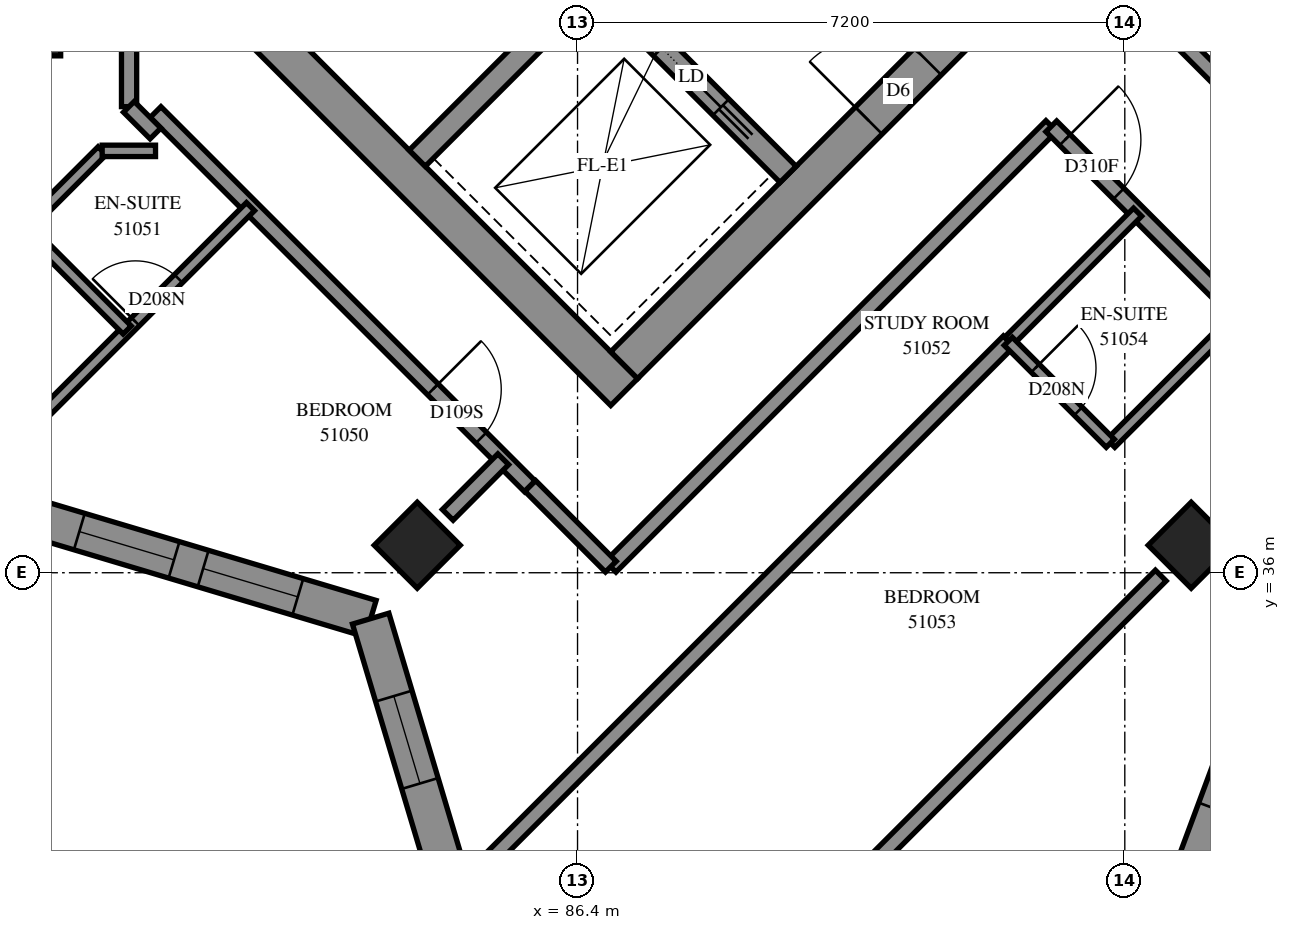
"""IFC4 building model, lengths in metres.
Left out: names, types, materials, properties, quantities, classifications, styles, units other than length and angle.
Written with IfcOpenShell. Run it as: python <this file> out.ifc"""

import sys

from ifc_helpers import new_model, si_unit, direction, frame, frame_2d, origin, origin_2d, place, context, subcontext, project, spatial, polyline, rectangle, outline, extrude, element, fill, save


model = new_model("IFC4")
c1 = context("Model", 3, precision=1e-05, world=origin(), true_north=direction((0.0, 1.0)))
c2 = subcontext(c1, "Body", "Model", "MODEL_VIEW")
j1 = project(units=[si_unit("LENGTHUNIT", "METRE"), si_unit("PLANEANGLEUNIT", "RADIAN")], contexts=[c1])
p1 = place(None, origin())
s1 = spatial("IfcSite", under=j1, at=p1, CompositionType="ELEMENT")
p2 = place(p1, origin())
s2 = spatial("IfcBuilding", under=s1, at=p2, CompositionType="ELEMENT")
p3 = place(p2, frame((0.0, 0.0, 189.6)))
s3 = spatial("IfcBuildingStorey", under=s2, at=p3, CompositionType="ELEMENT", Elevation=189.6)
for number, where, z_axis, x_axis in (
    (1, (79.2, 43.2, 0.0), (0.0, 0.0, 1.0), (1.0, 0.0, 0.0)),
    (2, (84.291, 36.362, 0.0), (0.0, 0.0, 1.0), (0.707, -0.707, 0.0)),
    (3, (94.474, 36.362, 0.0), (0.0, 0.0, 1.0), (0.707, -0.707, 0.0)),
):
    element("IfcColumn", number, at=place(p3, frame(where, z_axis=z_axis, x_axis=x_axis)), inside=s3, PredefinedType="COLUMN", context=c2, shape_type="SweptSolid", body=[
        extrude(rectangle(XDim=0.8, YDim=0.8, at=origin_2d()), origin(), (0.0, 0.0, 1.0), 3.1),
    ])
p4 = place(p3, frame((76.124, 49.267, -0.3), z_axis=(0.0, 0.0, 1.0), x_axis=(0.7071067812, -0.7071067812, 0.0)))
e4 = element("IfcWall", 4, at=p4, inside=s3, PredefinedType="SHEAR", context=c2, shape_type="SweptSolid", body=[
    extrude(rectangle(XDim=15.4, YDim=0.5, at=frame_2d((7.7, 0.0))), origin(), (0.0, 0.0, 1.0), 2.7),
])
p5 = place(p3, frame((87.013, 38.731, -0.3), z_axis=(0.0, 0.0, 1.0), x_axis=(0.7071067812, 0.7071067812, 0.0)))
e5 = element("IfcWall", 5, at=p5, inside=s3, PredefinedType="SHEAR", context=c2, shape_type="SweptSolid", body=[
    extrude(rectangle(XDim=14.4, YDim=0.5, at=frame_2d((7.2, 0.0))), origin(), (0.0, 0.0, 1.0), 2.7),
])
p6 = place(p5, frame((4.55, 0.0, 0.3)))
e6 = element("IfcOpeningElement", 6, at=p6, cuts=e5, PredefinedType="OPENING", context=c2, shape_type="SweptSolid", body=[
    extrude(rectangle(XDim=1.1, YDim=2.1, at=frame_2d((0.55, 1.05))), frame((0.0, 0.26, 0.0), z_axis=(0.0, -1.0, 0.0), x_axis=(1.0, 0.0, 0.0)), (0.0, 0.0, 1.0), 0.52),
])
p7 = place(p5, frame((11.35, 0.0, 0.3)))
e7 = element("IfcOpeningElement", 7, at=p7, cuts=e5, PredefinedType="OPENING", context=c2, shape_type="SweptSolid", body=[
    extrude(rectangle(XDim=1.1, YDim=2.1, at=frame_2d((0.55, 1.05))), frame((0.0, 0.26, 0.0), z_axis=(0.0, -1.0, 0.0), x_axis=(1.0, 0.0, 0.0)), (0.0, 0.0, 1.0), 0.52),
])
p8 = place(p3, frame((84.291, 41.453, 0.0), z_axis=(0.0, 0.0, 1.0), x_axis=(0.7071067812, 0.7071067812, 0.0)))
e8 = element("IfcWall", 8, at=p8, inside=s3, PredefinedType="SOLIDWALL", context=c2, shape_type="SweptSolid", body=[
    extrude(rectangle(XDim=3.3, YDim=0.3, at=frame_2d((1.65, 0.0))), origin(), (0.0, 0.0, 1.0), 3.1),
])
p9 = place(p3, frame((78.988, 51.423, 0.0), z_axis=(0.0, 0.0, 1.0), x_axis=(0.7071067812, -0.7071067812, 0.0)))
e9 = element("IfcWall", 9, at=p9, inside=s3, PredefinedType="SOLIDWALL", context=c2, shape_type="SweptSolid", body=[
    extrude(rectangle(XDim=14.4, YDim=0.3, at=frame_2d((7.2, 0.0))), origin(), (0.0, 0.0, 1.0), 3.1),
])
p10 = place(p9, frame((1.35, 0.0, 0.0)))
e10 = element("IfcOpeningElement", 10, at=p10, cuts=e9, PredefinedType="OPENING", context=c2, shape_type="SweptSolid", body=[
    extrude(rectangle(XDim=0.9, YDim=2.1, at=frame_2d((0.45, 1.05))), frame((0.0, 0.16, 0.0), z_axis=(0.0, -1.0, 0.0), x_axis=(1.0, 0.0, 0.0)), (0.0, 0.0, 1.0), 0.32),
])
p11 = place(p9, frame((4.95, 0.0, 0.0)))
e11 = element("IfcOpeningElement", 11, at=p11, cuts=e9, PredefinedType="OPENING", context=c2, shape_type="SweptSolid", body=[
    extrude(rectangle(XDim=0.9, YDim=2.1, at=frame_2d((0.45, 1.05))), frame((0.0, 0.16, 0.0), z_axis=(0.0, -1.0, 0.0), x_axis=(1.0, 0.0, 0.0)), (0.0, 0.0, 1.0), 0.32),
])
p12 = place(p9, frame((8.55, 0.0, 0.0)))
e12 = element("IfcOpeningElement", 12, at=p12, cuts=e9, PredefinedType="OPENING", context=c2, shape_type="SweptSolid", body=[
    extrude(rectangle(XDim=0.9, YDim=2.1, at=frame_2d((0.45, 1.05))), frame((0.0, 0.16, 0.0), z_axis=(0.0, -1.0, 0.0), x_axis=(1.0, 0.0, 0.0)), (0.0, 0.0, 1.0), 0.32),
])
p13 = place(p9, frame((12.05, 0.0, 0.0)))
e13 = element("IfcOpeningElement", 13, at=p13, cuts=e9, PredefinedType="OPENING", context=c2, shape_type="SweptSolid", body=[
    extrude(rectangle(XDim=1.1, YDim=2.1, at=frame_2d((0.55, 1.05))), frame((0.0, 0.16, 0.0), z_axis=(0.0, -1.0, 0.0), x_axis=(1.0, 0.0, 0.0)), (0.0, 0.0, 1.0), 0.32),
])
p14 = place(p3, frame((94.281, 31.47, 0.0), z_axis=(0.0, 0.0, 1.0), x_axis=(0.3481903374, 0.9374238577, 0.0)))
e14 = element("IfcWall", 14, at=p14, inside=s3, PredefinedType="SOLIDWALL", context=c2, shape_type="SweptSolid", body=[
    extrude(outline(polyline([(-0.12, -0.25), (5.16, -0.25), (5.39, 0.25), (0.12, 0.25), (-0.12, -0.25)])), origin(), (0.0, 0.0, 1.0), 3.1),
])
p15 = place(p14, frame((1.512, 0.0, 0.45)))
e15 = element("IfcOpeningElement", 15, at=p15, cuts=e14, PredefinedType="OPENING", context=c2, shape_type="SweptSolid", body=[
    extrude(rectangle(XDim=1.3, YDim=2.5, at=frame_2d((0.65, 1.25))), frame((0.0, 0.26, 0.0), z_axis=(0.0, -1.0, 0.0), x_axis=(1.0, 0.0, 0.0)), (0.0, 0.0, 1.0), 0.52),
])
p16 = place(p14, frame((3.012, 0.0, 0.45)))
e16 = element("IfcOpeningElement", 16, at=p16, cuts=e14, PredefinedType="OPENING", context=c2, shape_type="SweptSolid", body=[
    extrude(rectangle(XDim=1.3, YDim=2.5, at=frame_2d((0.65, 1.25))), frame((0.0, 0.26, 0.0), z_axis=(0.0, -1.0, 0.0), x_axis=(1.0, 0.0, 0.0)), (0.0, 0.0, 1.0), 0.52),
])
p17 = place(p3, frame((79.247, 36.721, 0.0), z_axis=(0.0, 0.0, 1.0), x_axis=(0.9581363614, -0.2863122647, 0.0)))
e17 = element("IfcWall", 17, at=p17, inside=s3, PredefinedType="SOLIDWALL", context=c2, shape_type="SweptSolid", body=[
    extrude(outline(polyline([(-0.141, -0.25), (4.49, -0.25), (4.76, 0.25), (0.141, 0.25), (-0.141, -0.25)])), origin(), (0.0, 0.0, 1.0), 3.1),
])
p18 = place(p17, frame((0.625, 0.0, 0.45)))
e18 = element("IfcOpeningElement", 18, at=p18, cuts=e17, PredefinedType="OPENING", context=c2, shape_type="SweptSolid", body=[
    extrude(rectangle(XDim=1.3, YDim=2.5, at=frame_2d((0.65, 1.25))), frame((0.0, 0.26, 0.0), z_axis=(0.0, -1.0, 0.0), x_axis=(1.0, 0.0, 0.0)), (0.0, 0.0, 1.0), 0.52),
])
p19 = place(p17, frame((2.325, 0.0, 0.45)))
e19 = element("IfcOpeningElement", 19, at=p19, cuts=e17, PredefinedType="OPENING", context=c2, shape_type="SweptSolid", body=[
    extrude(rectangle(XDim=1.3, YDim=2.5, at=frame_2d((0.65, 1.25))), frame((0.0, 0.26, 0.0), z_axis=(0.0, -1.0, 0.0), x_axis=(1.0, 0.0, 0.0)), (0.0, 0.0, 1.0), 0.52),
])
p20 = place(p3, frame((83.679, 35.396, 0.0), z_axis=(0.0, 0.0, 1.0), x_axis=(0.2863122647, -0.9581363614, 0.0)))
e20 = element("IfcWall", 20, at=p20, inside=s3, PredefinedType="SOLIDWALL", context=c2, shape_type="SweptSolid", body=[
    extrude(outline(polyline([(0.135, -0.25), (4.766, -0.25), (4.484, 0.25), (-0.135, 0.25), (0.135, -0.25)])), origin(), (0.0, 0.0, 1.0), 3.1),
])
p21 = place(p20, frame((1.064, 0.0, 0.45)))
e21 = element("IfcOpeningElement", 21, at=p21, cuts=e20, PredefinedType="OPENING", context=c2, shape_type="SweptSolid", body=[
    extrude(rectangle(XDim=1.2, YDim=2.5, at=frame_2d((0.6, 1.25))), frame((0.0, 0.26, 0.0), z_axis=(0.0, -1.0, 0.0), x_axis=(1.0, 0.0, 0.0)), (0.0, 0.0, 1.0), 0.52),
])
p22 = place(p3, frame((84.971, 31.945, 0.0), z_axis=(0.0, 0.0, 1.0), x_axis=(0.7072312442, 0.7069822963, 0.0)))
e22 = element("IfcWall", 22, at=p22, inside=s3, PredefinedType="PARTITIONING", context=c2, shape_type="SweptSolid", body=[
    extrude(rectangle(XDim=10.042, YDim=0.2, at=frame_2d((5.021, 0.0))), origin(), (0.0, 0.0, 1.0), 3.1),
])
p23 = place(p3, frame((86.835, 36.079, 0.0), z_axis=(0.0, 0.0, 1.0), x_axis=(0.7071067812, 0.7071067812, 0.0)))
e23 = element("IfcWall", 23, at=p23, inside=s3, PredefinedType="PARTITIONING", context=c2, shape_type="SweptSolid", body=[
    extrude(rectangle(XDim=8.2, YDim=0.2, at=frame_2d((4.1, 0.0))), origin(), (0.0, 0.0, 1.0), 3.1),
])
p24 = place(p3, frame((80.849, 42.061, 0.0), z_axis=(0.0, 0.0, 1.0), x_axis=(0.7071067812, -0.7071067812, 0.0)))
e24 = element("IfcWall", 24, at=p24, inside=s3, PredefinedType="PARTITIONING", context=c2, shape_type="SweptSolid", body=[
    extrude(rectangle(XDim=6.964, YDim=0.2, at=frame_2d((3.482, 0.0))), origin(), (0.0, 0.0, 1.0), 3.1),
])
p25 = place(p24, frame((5.159, 0.0, 0.0)))
e25 = element("IfcOpeningElement", 25, at=p25, cuts=e24, PredefinedType="OPENING", context=c2, shape_type="SweptSolid", body=[
    extrude(rectangle(XDim=0.9, YDim=2.1, at=frame_2d((0.45, 1.05))), frame((0.0, 0.11, 0.0), z_axis=(0.0, -1.0, 0.0), x_axis=(1.0, 0.0, 0.0)), (0.0, 0.0, 1.0), 0.22),
])
p26 = place(p3, frame((89.781, 31.671, 0.0), z_axis=(0.0, 0.0, 1.0), x_axis=(0.7071067812, 0.7071067812, 0.0)))
e26 = element("IfcWall", 26, at=p26, inside=s3, PredefinedType="PARTITIONING", context=c2, shape_type="SweptSolid", body=[
    extrude(rectangle(XDim=6.07, YDim=0.2, at=frame_2d((3.035, 0.0))), origin(), (0.0, 0.0, 1.0), 2.6),
])
p27 = place(p3, frame((94.047, 43.287, 0.0), z_axis=(0.0, 0.0, 1.0), x_axis=(0.7071067812, -0.7071067812, 0.0)))
e27 = element("IfcWall", 27, at=p27, inside=s3, PredefinedType="PARTITIONING", context=c2, shape_type="SweptSolid", body=[
    extrude(rectangle(XDim=5.199, YDim=0.2, at=frame_2d((2.599, 0.0))), origin(), (0.0, 0.0, 1.0), 3.1),
])
p28 = place(p27, frame((3.898, 0.0, 0.0)))
e28 = element("IfcOpeningElement", 28, at=p28, cuts=e27, PredefinedType="OPENING", context=c2, shape_type="SweptSolid", body=[
    extrude(rectangle(XDim=0.9, YDim=2.1, at=frame_2d((0.45, 1.05))), frame((0.0, 0.11, 0.0), z_axis=(0.0, -1.0, 0.0), x_axis=(1.0, 0.0, 0.0)), (0.0, 0.0, 1.0), 0.22),
])
p29 = place(p3, frame((92.633, 41.873, 0.0), z_axis=(0.0, 0.0, 1.0), x_axis=(0.7071067812, -0.7071067812, 0.0)))
e29 = element("IfcWall", 29, at=p29, inside=s3, PredefinedType="PARTITIONING", context=c2, shape_type="SweptSolid", body=[
    extrude(rectangle(XDim=5.199, YDim=0.2, at=frame_2d((2.599, 0.0))), origin(), (0.0, 0.0, 1.0), 3.1),
])
p30 = place(p29, frame((0.253, 0.0, 0.0)))
e30 = element("IfcOpeningElement", 30, at=p30, cuts=e29, PredefinedType="OPENING", context=c2, shape_type="SweptSolid", body=[
    extrude(rectangle(XDim=1.0, YDim=2.1, at=frame_2d((0.5, 1.05))), frame((0.0, 0.11, 0.0), z_axis=(0.0, -1.0, 0.0), x_axis=(1.0, 0.0, 0.0)), (0.0, 0.0, 1.0), 0.22),
])
p31 = place(p29, frame((3.948, 0.0, 0.0)))
e31 = element("IfcOpeningElement", 31, at=p31, cuts=e29, PredefinedType="OPENING", context=c2, shape_type="SweptSolid", body=[
    extrude(rectangle(XDim=0.9, YDim=2.1, at=frame_2d((0.45, 1.05))), frame((0.0, 0.11, 0.0), z_axis=(0.0, -1.0, 0.0), x_axis=(1.0, 0.0, 0.0)), (0.0, 0.0, 1.0), 0.22),
])
p32 = place(p3, frame((79.196, 37.915, 0.0), z_axis=(0.0, 0.0, 1.0), x_axis=(0.7070945944, 0.7071189677, 0.0)))
e32 = element("IfcWall", 32, at=p32, inside=s3, PredefinedType="PARTITIONING", context=c2, shape_type="SweptSolid", body=[
    extrude(rectangle(XDim=4.103, YDim=0.15, at=frame_2d((2.051, 0.0))), origin(), (0.0, 0.0, 1.0), 3.1),
])
p33 = place(p32, frame((1.962, 0.0, 0.0)))
e33 = element("IfcOpeningElement", 33, at=p33, cuts=e32, PredefinedType="OPENING", context=c2, shape_type="SweptSolid", body=[
    extrude(rectangle(XDim=0.8, YDim=2.1, at=frame_2d((0.4, 1.05))), frame((0.0, 0.085, 0.0), z_axis=(0.0, -1.0, 0.0), x_axis=(1.0, 0.0, 0.0)), (0.0, 0.0, 1.0), 0.17),
])
p34 = place(p3, frame((78.303, 41.369, 0.0), z_axis=(0.0, 0.0, 1.0), x_axis=(0.706602443, -0.7076107599, 0.0)))
e34 = element("IfcWall", 34, at=p34, inside=s3, PredefinedType="PARTITIONING", context=c2, shape_type="SweptSolid", body=[
    extrude(rectangle(XDim=3.074, YDim=0.15, at=frame_2d((1.537, 0.0))), origin(), (0.0, 0.0, 1.0), 3.1),
])
for number, where, z_axis, x_axis in (
    (35, (92.072, 39.046, 0.0), (0.0, 0.0, 1.0), (0.707, 0.708, 0.0)),
    (36, (93.415, 37.703, 0.0), (0.0, 0.0, 1.0), (0.708, 0.707, 0.0)),
):
    element("IfcWall", number, at=place(p3, frame(where, z_axis=z_axis, x_axis=x_axis)), inside=s3, PredefinedType="PARTITIONING", context=c2, shape_type="SweptSolid", body=[
        extrude(rectangle(XDim=2.4, YDim=0.15, at=frame_2d((1.2, 0.0))), origin(), (0.0, 0.0, 1.0), 3.1),
    ])
p35 = place(p3, frame((80.5, 42.132, 0.0), z_axis=(0.0, 0.0, 1.0), x_axis=(0.0, 1.0, 0.0)))
e37 = element("IfcWall", 37, at=p35, inside=s3, PredefinedType="PARTITIONING", context=c2, shape_type="SweptSolid", body=[
    extrude(rectangle(XDim=2.292, YDim=0.2, at=frame_2d((1.146, 0.0))), origin(), (0.0, 0.0, 1.0), 3.1),
])
p36 = place(p3, frame((78.644, 40.05, 0.0), z_axis=(0.0, 0.0, 1.0), x_axis=(0.7070832255, 0.7071303361, 0.0)))
e38 = element("IfcWall", 38, at=p36, inside=s3, PredefinedType="PARTITIONING", context=c2, shape_type="SweptSolid", body=[
    extrude(rectangle(XDim=2.123, YDim=0.15, at=frame_2d((1.061, 0.0))), origin(), (0.0, 0.0, 1.0), 3.1),
])
p37 = place(p3, frame((92.067, 39.045, 0.0), z_axis=(0.0, 0.0, 1.0), x_axis=(0.7071067812, -0.7071067812, 0.0)))
e39 = element("IfcWall", 39, at=p37, inside=s3, PredefinedType="PARTITIONING", context=c2, shape_type="SweptSolid", body=[
    extrude(rectangle(XDim=1.898, YDim=0.15, at=frame_2d((0.949, 0.0))), origin(), (0.0, 0.0, 1.0), 3.1),
])
p38 = place(p37, frame((0.501, 0.0, 0.0)))
e40 = element("IfcOpeningElement", 40, at=p38, cuts=e39, PredefinedType="OPENING", context=c2, shape_type="SweptSolid", body=[
    extrude(rectangle(XDim=0.8, YDim=2.1, at=frame_2d((0.4, 1.05))), frame((0.0, 0.085, 0.0), z_axis=(0.0, -1.0, 0.0), x_axis=(1.0, 0.0, 0.0)), (0.0, 0.0, 1.0), 0.17),
])
p39 = place(p3, frame((85.778, 37.142, 0.0), z_axis=(0.0, 0.0, 1.0), x_axis=(0.7064400143, -0.70777292, 0.0)))
e41 = element("IfcWall", 41, at=p39, inside=s3, PredefinedType="PARTITIONING", context=c2, shape_type="SweptSolid", body=[
    extrude(rectangle(XDim=1.5, YDim=0.2, at=frame_2d((0.75, 0.0))), origin(), (0.0, 0.0, 1.0), 3.1),
])
p40 = place(p3, frame((84.693, 36.761, 0.0), z_axis=(0.0, 0.0, 1.0), x_axis=(0.7061388061, 0.708073433, 0.0)))
e42 = element("IfcWall", 42, at=p40, inside=s3, PredefinedType="PARTITIONING", context=c2, shape_type="SweptSolid", body=[
    extrude(rectangle(XDim=1.034, YDim=0.2, at=frame_2d((0.517, 0.0))), origin(), (0.0, 0.0, 1.0), 3.1),
])
p41 = place(p3, frame((80.146, 41.55, 0.0), z_axis=(0.0, 0.0, 1.0), x_axis=(1.0, 0.0, 0.0)))
e43 = element("IfcWall", 43, at=p41, inside=s3, PredefinedType="PARTITIONING", context=c2, shape_type="SweptSolid", body=[
    extrude(rectangle(XDim=0.702, YDim=0.15, at=frame_2d((0.351, 0.0))), origin(), (0.0, 0.0, 1.0), 3.1),
])
p42 = place(p3, frame((80.497, 42.129, 0.0), z_axis=(0.0, 0.0, 1.0), x_axis=(0.7071067812, -0.7071067812, 0.0)))
e44 = element("IfcWall", 44, at=p42, inside=s3, PredefinedType="PARTITIONING", context=c2, shape_type="SweptSolid", body=[
    extrude(rectangle(XDim=0.495, YDim=0.2, at=frame_2d((0.247, 0.0))), origin(), (0.0, 0.0, 1.0), 3.1),
])
p43 = place(p15, origin())
e45 = element("IfcWindow", 45, at=p43, inside=s3, PartitioningType="SINGLE_PANEL", PredefinedType="WINDOW", context=c2, shape_type="SweptSolid", body=[
    extrude(rectangle(XDim=1.3, YDim=2.5, at=frame_2d((0.65, 1.25))), frame((0.0, 0.18, 0.0), z_axis=(0.0, -1.0, 0.0), x_axis=(1.0, 0.0, 0.0)), (0.0, 0.0, 1.0), 0.06),
])
fill(e15, e45)
p44 = place(p18, origin())
e46 = element("IfcWindow", 46, at=p44, inside=s3, PartitioningType="SINGLE_PANEL", PredefinedType="WINDOW", context=c2, shape_type="SweptSolid", body=[
    extrude(rectangle(XDim=1.3, YDim=2.5, at=frame_2d((0.65, 1.25))), frame((0.0, 0.18, 0.0), z_axis=(0.0, -1.0, 0.0), x_axis=(1.0, 0.0, 0.0)), (0.0, 0.0, 1.0), 0.06),
])
fill(e18, e46)
p45 = place(p19, origin())
e47 = element("IfcWindow", 47, at=p45, inside=s3, PartitioningType="SINGLE_PANEL", PredefinedType="WINDOW", context=c2, shape_type="SweptSolid", body=[
    extrude(rectangle(XDim=1.3, YDim=2.5, at=frame_2d((0.65, 1.25))), frame((0.0, 0.18, 0.0), z_axis=(0.0, -1.0, 0.0), x_axis=(1.0, 0.0, 0.0)), (0.0, 0.0, 1.0), 0.06),
])
fill(e19, e47)
p46 = place(p21, origin())
e48 = element("IfcWindow", 48, at=p46, inside=s3, PartitioningType="SINGLE_PANEL", PredefinedType="WINDOW", context=c2, shape_type="SweptSolid", body=[
    extrude(rectangle(XDim=1.2, YDim=2.5, at=frame_2d((0.6, 1.25))), frame((0.0, 0.18, 0.0), z_axis=(0.0, -1.0, 0.0), x_axis=(1.0, 0.0, 0.0)), (0.0, 0.0, 1.0), 0.06),
])
fill(e21, e48)
p47 = place(p6, origin())
e49 = element("IfcDoor", 49, at=p47, inside=s3, OperationType="DOUBLE_DOOR_SINGLE_SWING", PredefinedType="DOOR", context=c2, shape_type="SweptSolid", body=[
    extrude(rectangle(XDim=1.1, YDim=2.1, at=frame_2d((0.55, 1.05))), frame((0.0, 0.025, 0.0), z_axis=(0.0, -1.0, 0.0), x_axis=(1.0, 0.0, 0.0)), (0.0, 0.0, 1.0), 0.05),
])
fill(e6, e49)
p48 = place(p13, origin())
e50 = element("IfcDoor", 50, at=p48, inside=s3, OperationType="SLIDING_TO_RIGHT", PredefinedType="DOOR", context=c2, shape_type="SweptSolid", body=[
    extrude(rectangle(XDim=1.1, YDim=2.1, at=frame_2d((0.55, 1.05))), frame((0.0, 0.025, 0.0), z_axis=(0.0, -1.0, 0.0), x_axis=(1.0, 0.0, 0.0)), (0.0, 0.0, 1.0), 0.05),
])
fill(e13, e50)
p49 = place(p25, origin())
e51 = element("IfcDoor", 51, at=p49, inside=s3, OperationType="SINGLE_SWING_RIGHT", PredefinedType="DOOR", context=c2, shape_type="SweptSolid", body=[
    extrude(rectangle(XDim=0.9, YDim=2.1, at=frame_2d((0.45, 1.05))), frame((0.0, 0.025, 0.0), z_axis=(0.0, -1.0, 0.0), x_axis=(1.0, 0.0, 0.0)), (0.0, 0.0, 1.0), 0.05),
])
fill(e25, e51)
p50 = place(p33, origin())
e52 = element("IfcDoor", 52, at=p50, inside=s3, OperationType="SINGLE_SWING_RIGHT", PredefinedType="DOOR", context=c2, shape_type="SweptSolid", body=[
    extrude(rectangle(XDim=0.8, YDim=2.1, at=frame_2d((0.4, 1.05))), frame((0.0, 0.025, 0.0), z_axis=(0.0, -1.0, 0.0), x_axis=(1.0, 0.0, 0.0)), (0.0, 0.0, 1.0), 0.05),
])
fill(e33, e52)
p51 = place(p30, origin())
e53 = element("IfcDoor", 53, at=p51, inside=s3, OperationType="SINGLE_SWING_RIGHT", PredefinedType="DOOR", context=c2, shape_type="SweptSolid", body=[
    extrude(rectangle(XDim=1.0, YDim=2.1, at=frame_2d((0.5, 1.05))), frame((0.0, 0.025, 0.0), z_axis=(0.0, -1.0, 0.0), x_axis=(1.0, 0.0, 0.0)), (0.0, 0.0, 1.0), 0.05),
])
fill(e30, e53)
p52 = place(p38, origin())
e54 = element("IfcDoor", 54, at=p52, inside=s3, OperationType="SINGLE_SWING_RIGHT", PredefinedType="DOOR", context=c2, shape_type="SweptSolid", body=[
    extrude(rectangle(XDim=0.8, YDim=2.1, at=frame_2d((0.4, 1.05))), frame((0.0, 0.025, 0.0), z_axis=(0.0, -1.0, 0.0), x_axis=(1.0, 0.0, 0.0)), (0.0, 0.0, 1.0), 0.05),
])
fill(e40, e54)
save(model, sys.argv[1])
